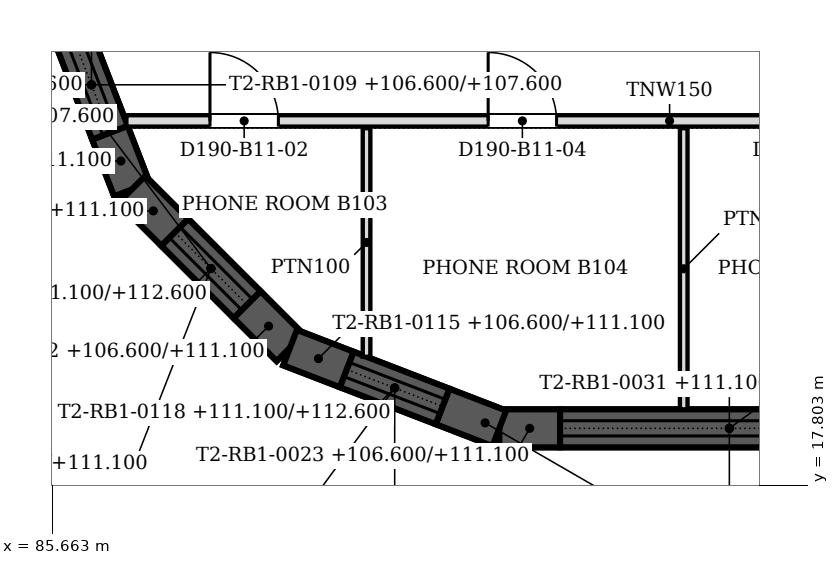
"""IFC4 building model, lengths in metres.
Left out: names, types, materials, properties, quantities, classifications, styles, units other than length and angle.
Written with IfcOpenShell. Run it as: python <this file> out.ifc"""

import sys

from ifc_helpers import new_model, si_unit, direction, frame, frame_2d, origin, place, context, subcontext, project, spatial, polyline, rectangle, outline, extrude, faceted_brep, source, transform, mapped, element, fill, save


model = new_model("IFC4")
c1 = context("Model", 3, precision=1e-05, world=origin(), true_north=direction((0.0, 1.0)))
c2 = subcontext(c1, "Body", "Model", "MODEL_VIEW")
j1 = project(units=[si_unit("LENGTHUNIT", "METRE"), si_unit("PLANEANGLEUNIT", "RADIAN")], contexts=[c1])
p1 = place(None, origin())
s1 = spatial("IfcSite", under=j1, at=p1, CompositionType="ELEMENT")
p2 = place(p1, origin())
s2 = spatial("IfcBuilding", under=s1, at=p2, CompositionType="ELEMENT")
p3 = place(p2, frame((0.0, 0.0, 106.6)))
s3 = spatial("IfcBuildingStorey", under=s2, at=p3, CompositionType="ELEMENT", Elevation=106.6)
m1 = source(origin(), c2, "Body", "Brep", [
    faceted_brep([(0.0, -0.25, 0.0), (0.8, -0.25, 0.0), (0.8, -0.25, 4.5), (0.0, -0.25, 4.5), (0.047, 0.25, 4.5), (0.8, 0.25, 4.5), (0.8, 0.25, 0.0), (0.047, 0.25, 0.0), (0.0, 0.0, 0.0), (0.0, 0.0, 4.5)], [[[0, 1, 2, 3]], [[4, 5, 6, 7]], [[7, 6, 1, 0, 8]], [[5, 4, 9, 3, 2]], [[8, 0, 3, 9]], [[7, 8, 9, 4]], [[1, 6, 5, 2]]]),
])
p4 = place(p3, frame((91.547, 18.55, 0.0), z_axis=(0.0, 0.0, 1.0), x_axis=(1.0, 0.0, 0.0)))
e1 = element("IfcWall", 1, at=p4, inside=s3, PredefinedType="SOLIDWALL", context=c2, shape_type="MappedRepresentation", body=[
    mapped(m1, transform((0.0, 0.0, 0.0), scale=1.0)),
])
m2 = source(origin(), c2, "Body", "SweptSolid", [
    extrude(outline(polyline([(0.0, 0.0), (4.453, 0.0), (4.453, 1.0), (0.0, 1.0), (0.0, 0.0)])), frame((0.0, 0.25, 0.0), z_axis=(0.0, -1.0, 0.0), x_axis=(1.0, 0.0, 0.0)), (0.0, 0.0, 1.0), 0.5),
])
p5 = place(p3, frame((92.346, 18.55, 0.0), z_axis=(0.0, 0.0, 1.0), x_axis=(1.0, 0.0, 0.0)))
e2 = element("IfcWall", 2, at=p5, inside=s3, PredefinedType="SOLIDWALL", context=c2, shape_type="MappedRepresentation", body=[
    mapped(m2, transform((0.0, 0.0, 0.0), scale=1.0)),
])
m3 = source(origin(), c2, "Body", "Brep", [
    faceted_brep([(0.0, -0.25, 0.0), (6.053, -0.25, 0.0), (6.053, -0.25, 1.5), (0.0, -0.25, 1.5), (0.047, 0.25, 1.5), (6.053, 0.25, 1.5), (6.053, 0.25, 0.0), (0.047, 0.25, 0.0), (0.0, 0.0, 0.0), (0.0, 0.0, 1.5)], [[[0, 1, 2, 3]], [[4, 5, 6, 7]], [[7, 6, 1, 0, 8]], [[5, 4, 9, 3, 2]], [[8, 0, 3, 9]], [[7, 8, 9, 4]], [[1, 6, 5, 2]]]),
])
p6 = place(p3, frame((91.547, 18.55, 4.5), z_axis=(0.0, 0.0, 1.0), x_axis=(1.0, 0.0, 0.0)))
e3 = element("IfcWall", 3, at=p6, inside=s3, PredefinedType="SOLIDWALL", context=c2, shape_type="MappedRepresentation", body=[
    mapped(m3, transform((0.0, 0.0, 0.0), scale=1.0)),
])
m4 = source(origin(), c2, "Body", "Brep", [
    faceted_brep([(0.0, -0.25, 0.0), (0.8, -0.25, 0.0), (0.8, -0.25, 4.5), (0.0, -0.25, 4.5), (0.0, 0.25, 4.5), (0.747, 0.25, 4.5), (0.747, 0.25, 0.0), (0.0, 0.25, 0.0), (0.8, -0.0, 0.0), (0.8, -0.0, 4.5)], [[[0, 1, 2, 3]], [[4, 5, 6, 7]], [[7, 6, 8, 1, 0]], [[9, 2, 1, 8]], [[5, 4, 3, 2, 9]], [[4, 7, 0, 3]], [[8, 6, 5, 9]]]),
])
p7 = place(p3, frame((86.424, 22.44, 0.0), z_axis=(0.0, 0.0, 1.0), x_axis=(0.359735468129, -0.933054335486, 0.0)))
e4 = element("IfcWall", 4, at=p7, inside=s3, PredefinedType="SOLIDWALL", context=c2, shape_type="MappedRepresentation", body=[
    mapped(m4, transform((0.0, 0.0, 0.0), scale=1.0)),
])
m5 = source(origin(), c2, "Body", "SweptSolid", [
    extrude(outline(polyline([(0.0, 0.0), (1.351, 0.0), (1.351, 1.0), (0.0, 1.0), (0.0, 0.0)])), frame((0.0, 0.25, 0.0), z_axis=(0.0, -1.0, 0.0), x_axis=(1.0, 0.0, 0.0)), (0.0, 0.0, 1.0), 0.5),
])
p8 = place(p3, frame((85.938, 23.7, 0.0), z_axis=(0.0, 0.0, 1.0), x_axis=(0.359923772835, -0.932981713512, 0.0)))
e5 = element("IfcWall", 5, at=p8, inside=s3, PredefinedType="SOLIDWALL", context=c2, shape_type="MappedRepresentation", body=[
    mapped(m5, transform((0.0, 0.0, 0.0), scale=1.0)),
])
m6 = source(origin(), c2, "Body", "Brep", [
    faceted_brep([(0.0, -0.25, 0.0), (2.95, -0.25, 0.0), (2.95, -0.25, 1.5), (0.0, -0.25, 1.5), (0.047, 0.25, 1.5), (2.898, 0.25, 1.5), (2.898, 0.25, 0.0), (0.047, 0.25, 0.0), (2.95, 0.0, 0.0), (0.0, 0.0, 0.0), (2.95, 0.0, 1.5), (0.0, 0.0, 1.5)], [[[0, 1, 2, 3]], [[4, 5, 6, 7]], [[7, 6, 8, 1, 0, 9]], [[10, 2, 1, 8]], [[5, 4, 11, 3, 2, 10]], [[9, 0, 3, 11]], [[7, 9, 11, 4]], [[8, 6, 5, 10]]]),
])
p9 = place(p3, frame((85.65, 24.447, 4.5), z_axis=(0.0, 0.0, 1.0), x_axis=(0.359949242603, -0.932971887438, 0.0)))
e6 = element("IfcWall", 6, at=p9, inside=s3, PredefinedType="SOLIDWALL", context=c2, shape_type="MappedRepresentation", body=[
    mapped(m6, transform((0.0, 0.0, 0.0), scale=1.0)),
])
m7 = source(origin(), c2, "Body", "Brep", [
    faceted_brep([(0.0, -0.25, 0.0), (0.8, -0.25, 0.0), (0.8, -0.25, 4.5), (0.0, -0.25, 4.5), (0.053, 0.25, 4.5), (0.8, 0.25, 4.5), (0.8, 0.25, 0.0), (0.053, 0.25, 0.0), (0.0, 0.0, 0.0), (0.0, 0.0, 4.5)], [[[0, 1, 2, 3]], [[4, 5, 6, 7]], [[7, 6, 1, 0, 8]], [[5, 4, 9, 3, 2]], [[8, 0, 3, 9]], [[7, 8, 9, 4]], [[1, 6, 5, 2]]]),
])
p10 = place(p3, frame((86.712, 21.694, 0.0), z_axis=(0.0, 0.0, 1.0), x_axis=(0.706954206636, -0.707259322823, 0.0)))
e7 = element("IfcWall", 7, at=p10, inside=s3, PredefinedType="SOLIDWALL", context=c2, shape_type="MappedRepresentation", body=[
    mapped(m7, transform((0.0, 0.0, 0.0), scale=1.0)),
])
p11 = place(p3, frame((88.228, 20.177, 0.0), z_axis=(0.0, 0.0, 1.0), x_axis=(0.707106781187, -0.707106781187, 0.0)))
e8 = element("IfcWall", 8, at=p11, inside=s3, PredefinedType="SOLIDWALL", context=c2, shape_type="MappedRepresentation", body=[
    mapped(m4, transform((0.0, 0.0, 0.0), scale=1.0)),
])
m8 = source(origin(), c2, "Body", "SweptSolid", [
    extrude(outline(polyline([(0.0, 0.0), (1.344, 0.0), (1.344, 1.0), (0.0, 1.0), (0.0, 0.0)])), frame((0.0, 0.25, 0.0), z_axis=(0.0, -1.0, 0.0), x_axis=(1.0, 0.0, 0.0)), (0.0, 0.0, 1.0), 0.5),
])
p12 = place(p3, frame((87.278, 21.128, 0.0), z_axis=(0.0, 0.0, 1.0), x_axis=(0.707106781187, -0.707106781187, 0.0)))
e9 = element("IfcWall", 9, at=p12, inside=s3, PredefinedType="SOLIDWALL", context=c2, shape_type="MappedRepresentation", body=[
    mapped(m8, transform((0.0, 0.0, 0.0), scale=1.0)),
])
m9 = source(origin(), c2, "Body", "Brep", [
    faceted_brep([(0.0, -0.25, 0.0), (2.944, -0.25, 0.0), (2.944, -0.25, 1.5), (0.0, -0.25, 1.5), (0.053, 0.25, 1.5), (2.891, 0.25, 1.5), (2.891, 0.25, 0.0), (0.053, 0.25, 0.0), (2.944, 0.0, 0.0), (0.0, 0.0, 0.0), (2.944, 0.0, 1.5), (0.0, 0.0, 1.5)], [[[0, 1, 2, 3]], [[4, 5, 6, 7]], [[7, 6, 8, 1, 0, 9]], [[10, 2, 1, 8]], [[5, 4, 11, 3, 2, 10]], [[9, 0, 3, 11]], [[7, 9, 11, 4]], [[8, 6, 5, 10]]]),
])
p13 = place(p3, frame((86.712, 21.694, 4.5), z_axis=(0.0, 0.0, 1.0), x_axis=(0.707106781187, -0.707106781187, 0.0)))
e10 = element("IfcWall", 10, at=p13, inside=s3, PredefinedType="SOLIDWALL", context=c2, shape_type="MappedRepresentation", body=[
    mapped(m9, transform((0.0, 0.0, 0.0), scale=1.0)),
])
p14 = place(p3, frame((88.794, 19.612, 0.0), z_axis=(0.0, 0.0, 1.0), x_axis=(0.933054335486, -0.359735468129, 0.0)))
e11 = element("IfcWall", 11, at=p14, inside=s3, PredefinedType="SOLIDWALL", context=c2, shape_type="MappedRepresentation", body=[
    mapped(m7, transform((0.0, 0.0, 0.0), scale=1.0)),
])
m10 = source(origin(), c2, "Body", "Brep", [
    faceted_brep([(0.0, -0.25, 0.0), (0.8, -0.25, 0.0), (0.8, -0.25, 4.5), (0.0, -0.25, 4.5), (0.0, 0.25, 4.5), (0.753, 0.25, 4.5), (0.753, 0.25, 0.0), (0.0, 0.25, 0.0), (0.8, -0.0, 0.0), (0.8, -0.0, 4.5)], [[[0, 1, 2, 3]], [[4, 5, 6, 7]], [[7, 6, 8, 1, 0]], [[9, 2, 1, 8]], [[5, 4, 3, 2, 9]], [[4, 7, 0, 3]], [[8, 6, 5, 9]]]),
])
p15 = place(p3, frame((90.8, 18.838, 0.0), z_axis=(0.0, 0.0, 1.0), x_axis=(0.933054335486, -0.359735468129, 0.0)))
e12 = element("IfcWall", 12, at=p15, inside=s3, PredefinedType="SOLIDWALL", context=c2, shape_type="MappedRepresentation", body=[
    mapped(m10, transform((0.0, 0.0, 0.0), scale=1.0)),
])
p16 = place(p3, frame((89.54, 19.324, 0.0), z_axis=(0.0, 0.0, 1.0), x_axis=(0.932981713512, -0.359923772835, 0.0)))
e13 = element("IfcWall", 13, at=p16, inside=s3, PredefinedType="SOLIDWALL", context=c2, shape_type="MappedRepresentation", body=[
    mapped(m5, transform((0.0, 0.0, 0.0), scale=1.0)),
])
m11 = source(origin(), c2, "Body", "Brep", [
    faceted_brep([(0.0, -0.25, 0.0), (2.95, -0.25, 0.0), (2.95, -0.25, 1.5), (0.0, -0.25, 1.5), (0.053, 0.25, 1.5), (2.904, 0.25, 1.5), (2.904, 0.25, 0.0), (0.053, 0.25, 0.0), (2.95, 0.0, 0.0), (0.0, 0.0, 0.0), (2.95, 0.0, 1.5), (0.0, 0.0, 1.5)], [[[0, 1, 2, 3]], [[4, 5, 6, 7]], [[7, 6, 8, 1, 0, 9]], [[10, 2, 1, 8]], [[5, 4, 11, 3, 2, 10]], [[9, 0, 3, 11]], [[7, 9, 11, 4]], [[8, 6, 5, 10]]]),
])
p17 = place(p3, frame((88.794, 19.612, 4.5), z_axis=(0.0, 0.0, 1.0), x_axis=(0.932999673775, -0.359877213415, 0.0)))
e14 = element("IfcWall", 14, at=p17, inside=s3, PredefinedType="SOLIDWALL", context=c2, shape_type="MappedRepresentation", body=[
    mapped(m11, transform((0.0, 0.0, 0.0), scale=1.0)),
])
p18 = place(p3, frame((93.973, 18.8, 0.0), z_axis=(0.0, 0.0, 1.0), x_axis=(0.0, 1.0, 0.0)))
e15 = element("IfcWall", 15, at=p18, inside=s3, PredefinedType="PARTITIONING", context=c2, shape_type="SweptSolid", body=[
    extrude(rectangle(XDim=3.699, YDim=0.1, at=frame_2d((1.85, 0.0))), origin(), (0.0, 0.0, 1.0), 5.167),
])
p19 = place(p3, frame((89.8, 19.492, 0.0), z_axis=(0.0, 0.0, 1.0), x_axis=(0.0, 1.0, 0.0)))
e16 = element("IfcWall", 16, at=p19, inside=s3, PredefinedType="PARTITIONING", context=c2, shape_type="SweptSolid", body=[
    extrude(rectangle(XDim=3.007, YDim=0.1, at=frame_2d((1.504, 0.0))), origin(), (0.0, 0.0, 1.0), 5.167),
])
p20 = place(p3, frame((97.524, 22.595, 0.0), z_axis=(0.0, 0.0, 1.0), x_axis=(-1.0, 0.0, 0.0)))
e17 = element("IfcWall", 17, at=p20, inside=s3, PredefinedType="PARTITIONING", context=c2, shape_type="SweptSolid", body=[
    extrude(rectangle(XDim=10.884, YDim=0.15, at=frame_2d((5.442, 0.0))), origin(), (0.0, 0.0, 1.0), 5.167),
])
m12 = source(origin(), c2, "Body", "SweptSolid", [
    extrude(rectangle(XDim=0.9, YDim=2.1, at=frame_2d((0.45, 1.05))), frame((0.0, 0.085, 0.0), z_axis=(0.0, -1.0, 0.0), x_axis=(1.0, 0.0, 0.0)), (0.0, 0.0, 1.0), 0.17),
])
p21 = place(p20, frame((8.884, 0.0, 0.0)))
e18 = element("IfcOpeningElement", 18, at=p21, cuts=e17, PredefinedType="OPENING", context=c2, shape_type="MappedRepresentation", body=[
    mapped(m12, transform((0.0, 0.0, 0.0), scale=1.0)),
])
p22 = place(p20, frame((1.35, 0.0, 0.0)))
e19 = element("IfcOpeningElement", 19, at=p22, cuts=e17, PredefinedType="OPENING", context=c2, shape_type="MappedRepresentation", body=[
    mapped(m12, transform((0.0, 0.0, 0.0), scale=1.0)),
])
p23 = place(p20, frame((5.224, 0.0, 0.0)))
e20 = element("IfcOpeningElement", 20, at=p23, cuts=e17, PredefinedType="OPENING", context=c2, shape_type="MappedRepresentation", body=[
    mapped(m12, transform((0.0, 0.0, 0.0), scale=1.0)),
])
m13 = source(origin(), c2, "Body", "SweptSolid", [
    extrude(rectangle(XDim=0.9, YDim=2.1, at=frame_2d((0.45, 1.05))), frame((0.0, 0.025, 0.0), z_axis=(0.0, -1.0, 0.0), x_axis=(1.0, 0.0, 0.0)), (0.0, 0.0, 1.0), 0.05),
])
p24 = place(p21, origin())
e21 = element("IfcDoor", 21, at=p24, inside=s3, OperationType="SINGLE_SWING_RIGHT", PredefinedType="DOOR", context=c2, shape_type="MappedRepresentation", body=[
    mapped(m13, transform((0.0, 0.0, 0.0), scale=1.0)),
])
fill(e18, e21)
p25 = place(p23, origin())
e22 = element("IfcDoor", 22, at=p25, inside=s3, OperationType="SINGLE_SWING_RIGHT", PredefinedType="DOOR", context=c2, shape_type="MappedRepresentation", body=[
    mapped(m13, transform((0.0, 0.0, 0.0), scale=1.0)),
])
fill(e20, e22)
save(model, sys.argv[1])
